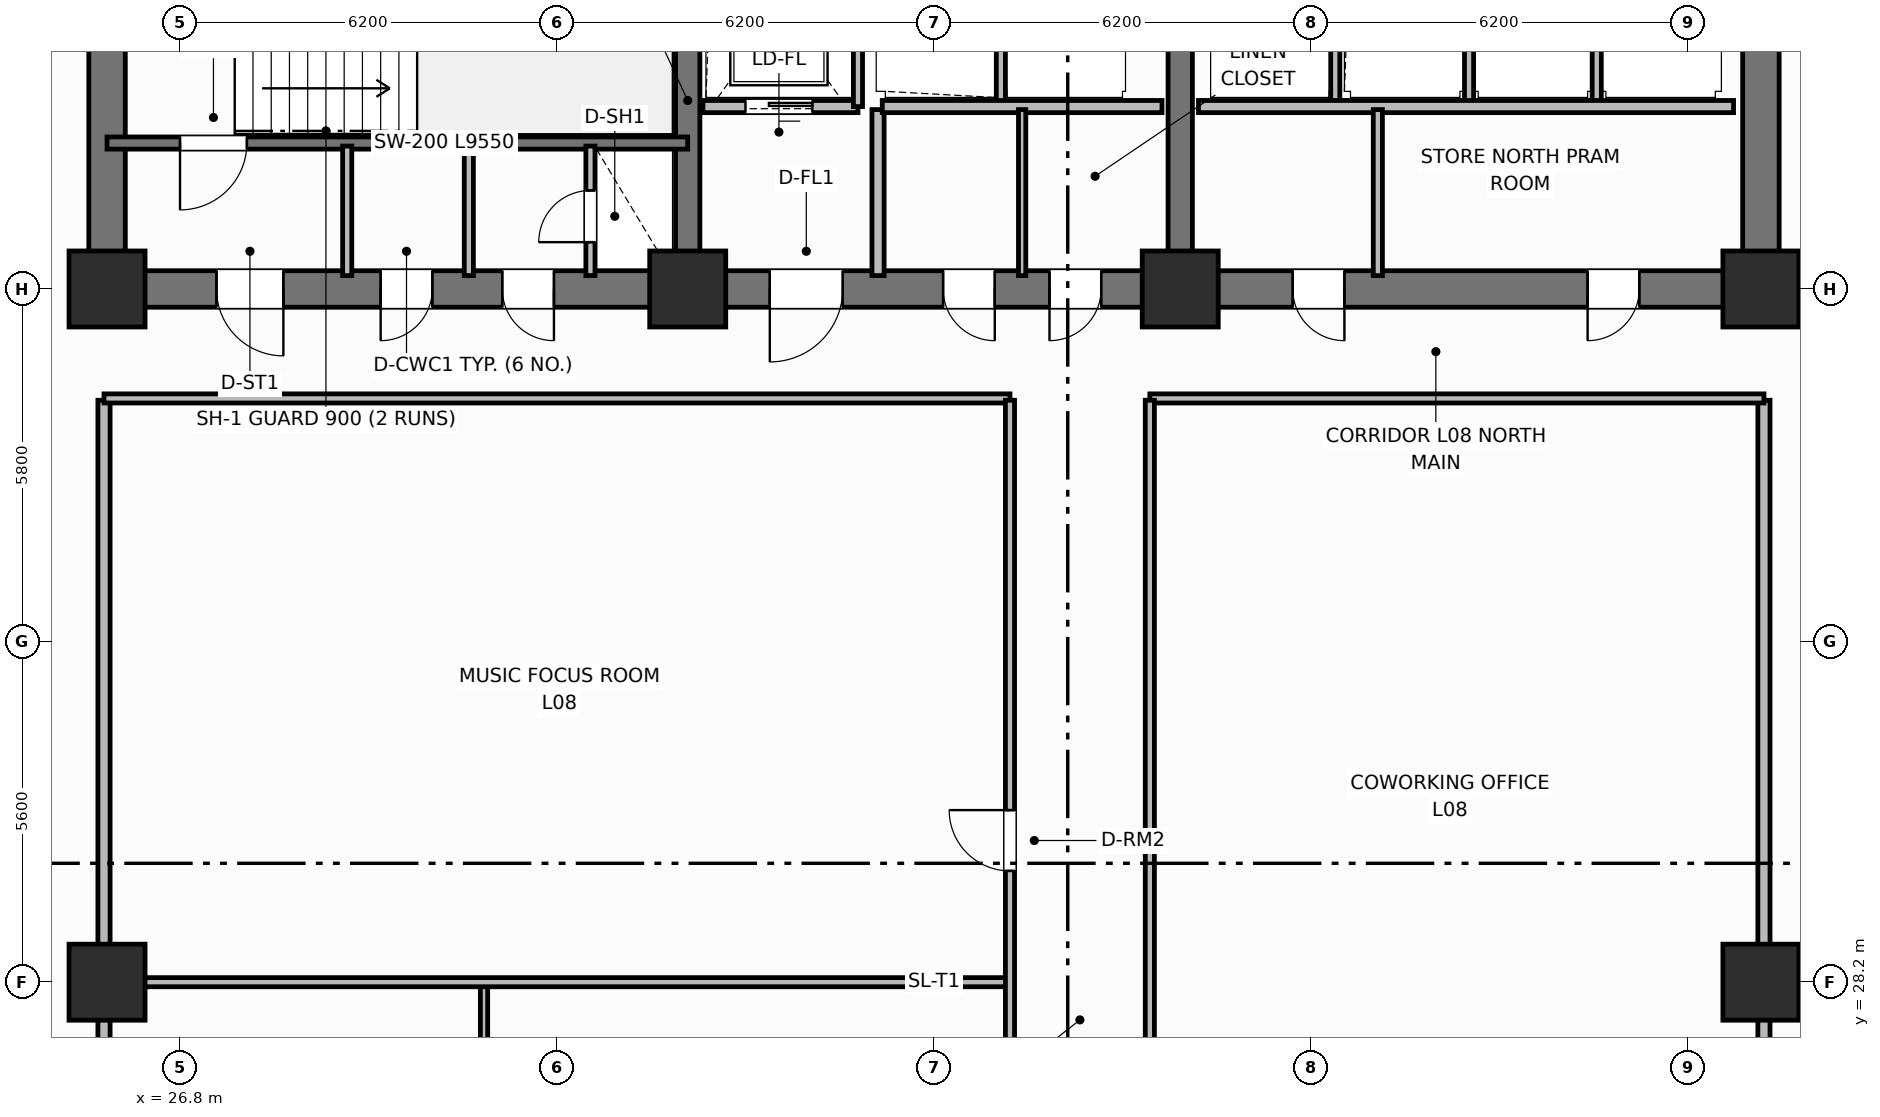
"""IFC4 building model, lengths in metres.
Left out: names, types, materials, properties, quantities, classifications, styles, units other than length and angle.
Written with IfcOpenShell. Run it as: python <this file> out.ifc"""

import sys

from ifc_helpers import new_model, si_unit, direction, frame, frame_2d, origin, origin_2d, place, context, subcontext, project, spatial, rectangle, extrude, element, fill, save


model = new_model("IFC4")
c1 = context("Model", 3, precision=1e-05, world=origin(), true_north=direction((0.0, 1.0)))
c2 = subcontext(c1, "Body", "Model", "MODEL_VIEW")
j1 = project(units=[si_unit("LENGTHUNIT", "METRE"), si_unit("PLANEANGLEUNIT", "RADIAN")], contexts=[c1])
p1 = place(None, origin())
s1 = spatial("IfcSite", under=j1, at=p1, CompositionType="ELEMENT")
p2 = place(p1, origin())
s2 = spatial("IfcBuilding", under=s1, at=p2, CompositionType="ELEMENT")
p3 = place(p2, frame((0.0, 0.0, 36.2)))
s3 = spatial("IfcBuildingStorey", under=s2, at=p3, CompositionType="ELEMENT", Elevation=36.2)
for number, where, z_axis, x_axis in (
    (1, (25.6, 39.9, 0.0), (0.0, 0.0, 1.0), (0.0, 1.0, 0.0)),
    (2, (52.8, 39.9, 0.0), (0.0, 0.0, 1.0), (0.0, 1.0, 0.0)),
):
    element("IfcWall", number, at=place(p3, frame(where, z_axis=z_axis, x_axis=x_axis)), inside=s3, PredefinedType="SHEAR", context=c2, shape_type="SweptSolid", body=[
        extrude(rectangle(XDim=5.6, YDim=0.6, at=frame_2d((2.8, 0.0))), origin(), (0.0, 0.0, 1.0), 3.7),
    ])
p4 = place(p3, frame((52.8, 39.6, 0.0), z_axis=(0.0, 0.0, 1.0), x_axis=(-1.0, 0.0, 0.0)))
e3 = element("IfcWall", 3, at=p4, inside=s3, PredefinedType="SHEAR", context=c2, shape_type="SweptSolid", body=[
    extrude(rectangle(XDim=27.2, YDim=0.6, at=frame_2d((13.6, 0.0))), origin(), (0.0, 0.0, 1.0), 3.7),
])
p5 = place(p4, frame((24.3, 0.0, 0.0)))
e4 = element("IfcOpeningElement", 4, at=p5, cuts=e3, PredefinedType="OPENING", context=c2, shape_type="SweptSolid", body=[
    extrude(rectangle(XDim=1.1, YDim=2.15, at=frame_2d((0.55, 1.075))), frame((0.0, 0.31, 0.0), z_axis=(0.0, -1.0, 0.0), x_axis=(1.0, 0.0, 0.0)), (0.0, 0.0, 1.0), 0.62),
])
p6 = place(p4, frame((21.85, 0.0, 0.0)))
e5 = element("IfcOpeningElement", 5, at=p6, cuts=e3, PredefinedType="OPENING", context=c2, shape_type="SweptSolid", body=[
    extrude(rectangle(XDim=0.85, YDim=2.1, at=frame_2d((0.425, 1.05))), frame((0.0, 0.31, 0.0), z_axis=(0.0, -1.0, 0.0), x_axis=(1.0, 0.0, 0.0)), (0.0, 0.0, 1.0), 0.62),
])
p7 = place(p4, frame((19.85, 0.0, 0.0)))
e6 = element("IfcOpeningElement", 6, at=p7, cuts=e3, PredefinedType="OPENING", context=c2, shape_type="SweptSolid", body=[
    extrude(rectangle(XDim=0.85, YDim=2.1, at=frame_2d((0.425, 1.05))), frame((0.0, 0.31, 0.0), z_axis=(0.0, -1.0, 0.0), x_axis=(1.0, 0.0, 0.0)), (0.0, 0.0, 1.0), 0.62),
])
p8 = place(p4, frame((15.1, 0.0, 0.0)))
e7 = element("IfcOpeningElement", 7, at=p8, cuts=e3, PredefinedType="OPENING", context=c2, shape_type="SweptSolid", body=[
    extrude(rectangle(XDim=1.2, YDim=2.15, at=frame_2d((0.6, 1.075))), frame((0.0, 0.31, 0.0), z_axis=(0.0, -1.0, 0.0), x_axis=(1.0, 0.0, 0.0)), (0.0, 0.0, 1.0), 0.62),
])
p9 = place(p4, frame((12.6, 0.0, 0.0)))
e8 = element("IfcOpeningElement", 8, at=p9, cuts=e3, PredefinedType="OPENING", context=c2, shape_type="SweptSolid", body=[
    extrude(rectangle(XDim=0.85, YDim=2.1, at=frame_2d((0.425, 1.05))), frame((0.0, 0.31, 0.0), z_axis=(0.0, -1.0, 0.0), x_axis=(1.0, 0.0, 0.0)), (0.0, 0.0, 1.0), 0.62),
])
p10 = place(p4, frame((10.85, 0.0, 0.0)))
e9 = element("IfcOpeningElement", 9, at=p10, cuts=e3, PredefinedType="OPENING", context=c2, shape_type="SweptSolid", body=[
    extrude(rectangle(XDim=0.85, YDim=2.1, at=frame_2d((0.425, 1.05))), frame((0.0, 0.31, 0.0), z_axis=(0.0, -1.0, 0.0), x_axis=(1.0, 0.0, 0.0)), (0.0, 0.0, 1.0), 0.62),
])
p11 = place(p4, frame((6.85, 0.0, 0.0)))
e10 = element("IfcOpeningElement", 10, at=p11, cuts=e3, PredefinedType="OPENING", context=c2, shape_type="SweptSolid", body=[
    extrude(rectangle(XDim=0.85, YDim=2.1, at=frame_2d((0.425, 1.05))), frame((0.0, 0.31, 0.0), z_axis=(0.0, -1.0, 0.0), x_axis=(1.0, 0.0, 0.0)), (0.0, 0.0, 1.0), 0.62),
])
p12 = place(p4, frame((2.0, 0.0, 0.0)))
e11 = element("IfcOpeningElement", 11, at=p12, cuts=e3, PredefinedType="OPENING", context=c2, shape_type="SweptSolid", body=[
    extrude(rectangle(XDim=0.85, YDim=2.1, at=frame_2d((0.425, 1.05))), frame((0.0, 0.31, 0.0), z_axis=(0.0, -1.0, 0.0), x_axis=(1.0, 0.0, 0.0)), (0.0, 0.0, 1.0), 0.62),
])
for number, where, z_axis, x_axis in (
    (12, (35.15, 39.9, 0.0), (0.0, 0.0, 1.0), (0.0, 1.0, 0.0)),
    (13, (43.25, 39.9, 0.0), (0.0, 0.0, 1.0), (0.0, 1.0, 0.0)),
):
    element("IfcWall", number, at=place(p3, frame(where, z_axis=z_axis, x_axis=x_axis)), inside=s3, PredefinedType="SHEAR", context=c2, shape_type="SweptSolid", body=[
        extrude(rectangle(XDim=5.6, YDim=0.4, at=frame_2d((2.8, 0.0))), origin(), (0.0, 0.0, 1.0), 3.7),
    ])
for number, where, z_axis, x_axis in (
    (14, (25.6, 39.6, 0.0), (0.0, 0.0, 1.0), (1.0, 0.0, 0.0)),
    (15, (35.15, 39.6, 0.0), (0.0, 0.0, 1.0), (1.0, 0.0, 0.0)),
    (16, (43.25, 39.6, 0.0), (0.0, 0.0, 1.0), (1.0, 0.0, 0.0)),
    (17, (52.8, 39.6, 0.0), (0.0, 0.0, 1.0), (1.0, 0.0, 0.0)),
    (18, (25.6, 28.2, 0.0), (0.0, 0.0, 1.0), (1.0, 0.0, 0.0)),
    (19, (52.8, 28.2, 0.0), (0.0, 0.0, 1.0), (1.0, 0.0, 0.0)),
):
    element("IfcColumn", number, at=place(p3, frame(where, z_axis=z_axis, x_axis=x_axis)), inside=s3, PredefinedType="COLUMN", context=c2, shape_type="SweptSolid", body=[
        extrude(rectangle(XDim=1.25, YDim=1.25, at=origin_2d()), origin(), (0.0, 0.0, 1.0), 3.7),
    ])
p13 = place(p3, frame((35.15, 42.0, 0.0), z_axis=(0.0, 0.0, 1.0), x_axis=(-1.0, 0.0, 0.0)))
e20 = element("IfcWall", 20, at=p13, inside=s3, PredefinedType="SHEAR", context=c2, shape_type="SweptSolid", body=[
    extrude(rectangle(XDim=9.55, YDim=0.2, at=frame_2d((4.775, 0.0))), origin(), (0.0, 0.0, 1.0), 3.7),
])
p14 = place(p13, frame((7.25, 0.0, 0.0)))
e21 = element("IfcOpeningElement", 21, at=p14, cuts=e20, PredefinedType="OPENING", context=c2, shape_type="SweptSolid", body=[
    extrude(rectangle(XDim=1.1, YDim=2.15, at=frame_2d((0.55, 1.075))), frame((0.0, 0.11, 0.0), z_axis=(0.0, -1.0, 0.0), x_axis=(1.0, 0.0, 0.0)), (0.0, 0.0, 1.0), 0.22),
])
p15 = place(p3, frame((33.55, 39.82, 0.0), z_axis=(0.0, 0.0, 1.0), x_axis=(0.0, 1.0, 0.0)))
e22 = element("IfcWall", 22, at=p15, inside=s3, PredefinedType="PARTITIONING", context=c2, shape_type="SweptSolid", body=[
    extrude(rectangle(XDim=2.13, YDim=0.15, at=frame_2d((1.065, 0.0))), origin(), (0.0, 0.0, 1.0), 2.53),
])
p16 = place(p15, frame((0.55, 0.0, 0.0)))
e23 = element("IfcOpeningElement", 23, at=p16, cuts=e22, PredefinedType="OPENING", context=c2, shape_type="SweptSolid", body=[
    extrude(rectangle(XDim=0.85, YDim=2.05, at=frame_2d((0.425, 1.025))), frame((0.0, 0.085, 0.0), z_axis=(0.0, -1.0, 0.0), x_axis=(1.0, 0.0, 0.0)), (0.0, 0.0, 1.0), 0.17),
])
for number, where, z_axis, x_axis in (
    (24, (29.55, 39.82, 0.0), (0.0, 0.0, 1.0), (0.0, 1.0, 0.0)),
    (25, (31.55, 39.82, 0.0), (0.0, 0.0, 1.0), (0.0, 1.0, 0.0)),
):
    element("IfcWall", number, at=place(p3, frame(where, z_axis=z_axis, x_axis=x_axis)), inside=s3, PredefinedType="PARTITIONING", context=c2, shape_type="SweptSolid", body=[
        extrude(rectangle(XDim=2.13, YDim=0.15, at=frame_2d((1.065, 0.0))), origin(), (0.0, 0.0, 1.0), 2.53),
    ])
p17 = place(p3, frame((37.95, 42.6, 0.0), z_axis=(0.0, 0.0, 1.0), x_axis=(-1.0, 0.0, 0.0)))
e26 = element("IfcWall", 26, at=p17, inside=s3, PredefinedType="PARTITIONING", context=c2, shape_type="SweptSolid", body=[
    extrude(rectangle(XDim=2.55, YDim=0.2, at=frame_2d((1.275, 0.0))), origin(), (0.0, 0.0, 1.0), 2.3),
])
p18 = place(p17, frame((0.75, 0.0, 0.0)))
e27 = element("IfcOpeningElement", 27, at=p18, cuts=e26, PredefinedType="OPENING", context=c2, shape_type="SweptSolid", body=[
    extrude(rectangle(XDim=1.1, YDim=2.15, at=frame_2d((0.55, 1.075))), frame((0.0, 0.11, 0.0), z_axis=(0.0, -1.0, 0.0), x_axis=(1.0, 0.0, 0.0)), (0.0, 0.0, 1.0), 0.22),
])
p19 = place(p3, frame((37.95, 42.6, 0.0), z_axis=(0.0, 0.0, 1.0), x_axis=(0.0, 1.0, 0.0)))
e28 = element("IfcWall", 28, at=p19, inside=s3, PredefinedType="PARTITIONING", context=c2, shape_type="SweptSolid", body=[
    extrude(rectangle(XDim=2.85, YDim=0.15, at=frame_2d((1.425, 0.0))), origin(), (0.0, 0.0, 1.0), 2.53),
])
p20 = place(p3, frame((38.28, 39.82, 0.0), z_axis=(0.0, 0.0, 1.0), x_axis=(0.0, 1.0, 0.0)))
e29 = element("IfcWall", 29, at=p20, inside=s3, PredefinedType="PARTITIONING", context=c2, shape_type="SweptSolid", body=[
    extrude(rectangle(XDim=2.73, YDim=0.2, at=frame_2d((1.365, 0.0))), origin(), (0.0, 0.0, 1.0), 2.53),
])
p21 = place(p3, frame((40.3, 42.65, 0.0), z_axis=(0.0, 0.0, 1.0), x_axis=(0.0, 1.0, 0.0)))
e30 = element("IfcWall", 30, at=p21, inside=s3, PredefinedType="PARTITIONING", context=c2, shape_type="SweptSolid", body=[
    extrude(rectangle(XDim=2.8, YDim=0.15, at=frame_2d((1.4, 0.0))), origin(), (0.0, 0.0, 1.0), 2.53),
])
p22 = place(p3, frame((42.95, 42.6, 0.0), z_axis=(0.0, 0.0, 1.0), x_axis=(-1.0, 0.0, 0.0)))
e31 = element("IfcWall", 31, at=p22, inside=s3, PredefinedType="PARTITIONING", context=c2, shape_type="SweptSolid", body=[
    extrude(rectangle(XDim=4.6, YDim=0.2, at=frame_2d((2.3, 0.0))), origin(), (0.0, 0.0, 1.0), 2.3),
])
p23 = place(p3, frame((40.65, 39.82, 0.0), z_axis=(0.0, 0.0, 1.0), x_axis=(0.0, 1.0, 0.0)))
e32 = element("IfcWall", 32, at=p23, inside=s3, PredefinedType="PARTITIONING", context=c2, shape_type="SweptSolid", body=[
    extrude(rectangle(XDim=2.73, YDim=0.12, at=frame_2d((1.365, 0.0))), origin(), (0.0, 0.0, 1.0), 2.53),
])
for number, where, z_axis, x_axis in (
    (33, (45.8, 42.65, 0.0), (0.0, 0.0, 1.0), (0.0, 1.0, 0.0)),
    (34, (48.0, 42.65, 0.0), (0.0, 0.0, 1.0), (0.0, 1.0, 0.0)),
    (35, (50.1, 42.65, 0.0), (0.0, 0.0, 1.0), (0.0, 1.0, 0.0)),
):
    element("IfcWall", number, at=place(p3, frame(where, z_axis=z_axis, x_axis=x_axis)), inside=s3, PredefinedType="PARTITIONING", context=c2, shape_type="SweptSolid", body=[
        extrude(rectangle(XDim=2.8, YDim=0.15, at=frame_2d((1.4, 0.0))), origin(), (0.0, 0.0, 1.0), 2.53),
    ])
p24 = place(p3, frame((52.35, 42.6, 0.0), z_axis=(0.0, 0.0, 1.0), x_axis=(-1.0, 0.0, 0.0)))
e36 = element("IfcWall", 36, at=p24, inside=s3, PredefinedType="PARTITIONING", context=c2, shape_type="SweptSolid", body=[
    extrude(rectangle(XDim=8.8, YDim=0.2, at=frame_2d((4.4, 0.0))), origin(), (0.0, 0.0, 1.0), 2.53),
])
p25 = place(p3, frame((46.5, 39.82, 0.0), z_axis=(0.0, 0.0, 1.0), x_axis=(0.0, 1.0, 0.0)))
e37 = element("IfcWall", 37, at=p25, inside=s3, PredefinedType="PARTITIONING", context=c2, shape_type="SweptSolid", body=[
    extrude(rectangle(XDim=2.73, YDim=0.15, at=frame_2d((1.365, 0.0))), origin(), (0.0, 0.0, 1.0), 2.53),
])
for number, where, z_axis, x_axis in (
    (38, (25.55, 18.63, 0.0), (0.0, 0.0, 1.0), (0.0, 1.0, 0.0)),
    (39, (52.85, 18.63, 0.0), (0.0, 0.0, 1.0), (0.0, 1.0, 0.0)),
):
    element("IfcWall", number, at=place(p3, frame(where, z_axis=z_axis, x_axis=x_axis)), inside=s3, PredefinedType="PARTITIONING", context=c2, shape_type="SweptSolid", body=[
        extrude(rectangle(XDim=19.14, YDim=0.2, at=frame_2d((9.57, 0.0))), origin(), (0.0, 0.0, 1.0), 2.53),
    ])
p26 = place(p3, frame((25.55, 37.8, 0.0), z_axis=(0.0, 0.0, 1.0), x_axis=(1.0, 0.0, 0.0)))
e40 = element("IfcWall", 40, at=p26, inside=s3, PredefinedType="PARTITIONING", context=c2, shape_type="SweptSolid", body=[
    extrude(rectangle(XDim=14.9, YDim=0.15, at=frame_2d((7.45, 0.0))), origin(), (0.0, 0.0, 1.0), 2.53),
])
p27 = place(p3, frame((42.75, 37.8, 0.0), z_axis=(0.0, 0.0, 1.0), x_axis=(1.0, 0.0, 0.0)))
e41 = element("IfcWall", 41, at=p27, inside=s3, PredefinedType="PARTITIONING", context=c2, shape_type="SweptSolid", body=[
    extrude(rectangle(XDim=10.1, YDim=0.15, at=frame_2d((5.05, 0.0))), origin(), (0.0, 0.0, 1.0), 2.53),
])
p28 = place(p3, frame((31.8, 18.66, 0.0), z_axis=(0.0, 0.0, 1.0), x_axis=(0.0, 1.0, 0.0)))
e42 = element("IfcWall", 42, at=p28, inside=s3, PredefinedType="PARTITIONING", context=c2, shape_type="SweptSolid", body=[
    extrude(rectangle(XDim=9.49, YDim=0.12, at=frame_2d((4.745, 0.0))), origin(), (0.0, 0.0, 1.0), 2.53),
])
p29 = place(p28, frame((2.2, 0.0, 0.0)))
e43 = element("IfcOpeningElement", 43, at=p29, cuts=e42, PredefinedType="OPENING", context=c2, shape_type="SweptSolid", body=[
    extrude(rectangle(XDim=0.9, YDim=2.1, at=frame_2d((0.45, 1.05))), frame((0.0, 0.07, 0.0), z_axis=(0.0, -1.0, 0.0), x_axis=(1.0, 0.0, 0.0)), (0.0, 0.0, 1.0), 0.14),
])
p30 = place(p3, frame((25.6, 28.2, 0.0), z_axis=(0.0, 0.0, 1.0), x_axis=(1.0, 0.0, 0.0)))
e44 = element("IfcWall", 44, at=p30, inside=s3, PredefinedType="PARTITIONING", context=c2, shape_type="SweptSolid", body=[
    extrude(rectangle(XDim=14.87, YDim=0.15, at=frame_2d((7.435, 0.0))), origin(), (0.0, 0.0, 1.0), 2.53),
])
p31 = place(p3, frame((40.45, 18.63, 0.0), z_axis=(0.0, 0.0, 1.0), x_axis=(0.0, 1.0, 0.0)))
e45 = element("IfcWall", 45, at=p31, inside=s3, PredefinedType="PARTITIONING", context=c2, shape_type="SweptSolid", body=[
    extrude(rectangle(XDim=19.14, YDim=0.15, at=frame_2d((9.57, 0.0))), origin(), (0.0, 0.0, 1.0), 2.53),
])
p32 = place(p31, frame((2.4, 0.0, 0.0)))
e46 = element("IfcOpeningElement", 46, at=p32, cuts=e45, PredefinedType="OPENING", context=c2, shape_type="SweptSolid", body=[
    extrude(rectangle(XDim=1.0, YDim=2.15, at=frame_2d((0.5, 1.075))), frame((0.0, 0.085, 0.0), z_axis=(0.0, -1.0, 0.0), x_axis=(1.0, 0.0, 0.0)), (0.0, 0.0, 1.0), 0.17),
])
p33 = place(p31, frame((11.4, 0.0, 0.0)))
e47 = element("IfcOpeningElement", 47, at=p33, cuts=e45, PredefinedType="OPENING", context=c2, shape_type="SweptSolid", body=[
    extrude(rectangle(XDim=1.0, YDim=2.15, at=frame_2d((0.5, 1.075))), frame((0.0, 0.085, 0.0), z_axis=(0.0, -1.0, 0.0), x_axis=(1.0, 0.0, 0.0)), (0.0, 0.0, 1.0), 0.17),
])
p34 = place(p3, frame((42.75, 18.63, 0.0), z_axis=(0.0, 0.0, 1.0), x_axis=(0.0, 1.0, 0.0)))
e48 = element("IfcWall", 48, at=p34, inside=s3, PredefinedType="PARTITIONING", context=c2, shape_type="SweptSolid", body=[
    extrude(rectangle(XDim=19.14, YDim=0.15, at=frame_2d((9.57, 0.0))), origin(), (0.0, 0.0, 1.0), 2.53),
])
p35 = place(p34, frame((5.5, 0.0, 0.0)))
e49 = element("IfcOpeningElement", 49, at=p35, cuts=e48, PredefinedType="OPENING", context=c2, shape_type="SweptSolid", body=[
    extrude(rectangle(XDim=1.0, YDim=2.15, at=frame_2d((0.5, 1.075))), frame((0.0, 0.085, 0.0), z_axis=(0.0, -1.0, 0.0), x_axis=(1.0, 0.0, 0.0)), (0.0, 0.0, 1.0), 0.17),
])
p36 = place(p14, origin())
e50 = element("IfcDoor", 50, at=p36, inside=s3, OperationType="SINGLE_SWING_RIGHT", PredefinedType="DOOR", context=c2, shape_type="SweptSolid", body=[
    extrude(rectangle(XDim=1.1, YDim=2.15, at=frame_2d((0.55, 1.075))), frame((0.0, 0.025, 0.0), z_axis=(0.0, -1.0, 0.0), x_axis=(1.0, 0.0, 0.0)), (0.0, 0.0, 1.0), 0.05),
])
fill(e21, e50)
p37 = place(p16, origin())
e51 = element("IfcDoor", 51, at=p37, inside=s3, OperationType="SINGLE_SWING_LEFT", PredefinedType="TRAPDOOR", context=c2, shape_type="SweptSolid", body=[
    extrude(rectangle(XDim=0.85, YDim=2.05, at=frame_2d((0.425, 1.025))), frame((0.0, 0.025, 0.0), z_axis=(0.0, -1.0, 0.0), x_axis=(1.0, 0.0, 0.0)), (0.0, 0.0, 1.0), 0.05),
])
fill(e23, e51)
p38 = place(p18, origin())
e52 = element("IfcDoor", 52, at=p38, inside=s3, OperationType="SLIDING_TO_LEFT", PredefinedType="DOOR", context=c2, shape_type="SweptSolid", body=[
    extrude(rectangle(XDim=1.1, YDim=2.15, at=frame_2d((0.55, 1.075))), frame((0.0, 0.025, 0.0), z_axis=(0.0, -1.0, 0.0), x_axis=(1.0, 0.0, 0.0)), (0.0, 0.0, 1.0), 0.05),
])
fill(e27, e52)
p39 = place(p33, origin())
e53 = element("IfcDoor", 53, at=p39, inside=s3, OperationType="SINGLE_SWING_RIGHT", PredefinedType="DOOR", context=c2, shape_type="SweptSolid", body=[
    extrude(rectangle(XDim=1.0, YDim=2.15, at=frame_2d((0.5, 1.075))), frame((0.0, 0.025, 0.0), z_axis=(0.0, -1.0, 0.0), x_axis=(1.0, 0.0, 0.0)), (0.0, 0.0, 1.0), 0.05),
])
fill(e47, e53)
p40 = place(p5, origin())
e54 = element("IfcDoor", 54, at=p40, inside=s3, OperationType="SINGLE_SWING_LEFT", PredefinedType="DOOR", context=c2, shape_type="SweptSolid", body=[
    extrude(rectangle(XDim=1.1, YDim=2.15, at=frame_2d((0.55, 1.075))), frame((0.0, 0.025, 0.0), z_axis=(0.0, -1.0, 0.0), x_axis=(1.0, 0.0, 0.0)), (0.0, 0.0, 1.0), 0.05),
])
fill(e4, e54)
p41 = place(p6, origin())
e55 = element("IfcDoor", 55, at=p41, inside=s3, OperationType="SINGLE_SWING_RIGHT", PredefinedType="DOOR", context=c2, shape_type="SweptSolid", body=[
    extrude(rectangle(XDim=0.85, YDim=2.1, at=frame_2d((0.425, 1.05))), frame((0.0, 0.025, 0.0), z_axis=(0.0, -1.0, 0.0), x_axis=(1.0, 0.0, 0.0)), (0.0, 0.0, 1.0), 0.05),
])
fill(e5, e55)
p42 = place(p7, origin())
e56 = element("IfcDoor", 56, at=p42, inside=s3, OperationType="SINGLE_SWING_LEFT", PredefinedType="DOOR", context=c2, shape_type="SweptSolid", body=[
    extrude(rectangle(XDim=0.85, YDim=2.1, at=frame_2d((0.425, 1.05))), frame((0.0, 0.025, 0.0), z_axis=(0.0, -1.0, 0.0), x_axis=(1.0, 0.0, 0.0)), (0.0, 0.0, 1.0), 0.05),
])
fill(e6, e56)
p43 = place(p8, origin())
e57 = element("IfcDoor", 57, at=p43, inside=s3, OperationType="SINGLE_SWING_RIGHT", PredefinedType="DOOR", context=c2, shape_type="SweptSolid", body=[
    extrude(rectangle(XDim=1.2, YDim=2.15, at=frame_2d((0.6, 1.075))), frame((0.0, 0.025, 0.0), z_axis=(0.0, -1.0, 0.0), x_axis=(1.0, 0.0, 0.0)), (0.0, 0.0, 1.0), 0.05),
])
fill(e7, e57)
p44 = place(p9, origin())
e58 = element("IfcDoor", 58, at=p44, inside=s3, OperationType="SINGLE_SWING_LEFT", PredefinedType="DOOR", context=c2, shape_type="SweptSolid", body=[
    extrude(rectangle(XDim=0.85, YDim=2.1, at=frame_2d((0.425, 1.05))), frame((0.0, 0.025, 0.0), z_axis=(0.0, -1.0, 0.0), x_axis=(1.0, 0.0, 0.0)), (0.0, 0.0, 1.0), 0.05),
])
fill(e8, e58)
p45 = place(p10, origin())
e59 = element("IfcDoor", 59, at=p45, inside=s3, OperationType="SINGLE_SWING_RIGHT", PredefinedType="DOOR", context=c2, shape_type="SweptSolid", body=[
    extrude(rectangle(XDim=0.85, YDim=2.1, at=frame_2d((0.425, 1.05))), frame((0.0, 0.025, 0.0), z_axis=(0.0, -1.0, 0.0), x_axis=(1.0, 0.0, 0.0)), (0.0, 0.0, 1.0), 0.05),
])
fill(e9, e59)
p46 = place(p11, origin())
e60 = element("IfcDoor", 60, at=p46, inside=s3, OperationType="SINGLE_SWING_LEFT", PredefinedType="DOOR", context=c2, shape_type="SweptSolid", body=[
    extrude(rectangle(XDim=0.85, YDim=2.1, at=frame_2d((0.425, 1.05))), frame((0.0, 0.025, 0.0), z_axis=(0.0, -1.0, 0.0), x_axis=(1.0, 0.0, 0.0)), (0.0, 0.0, 1.0), 0.05),
])
fill(e10, e60)
p47 = place(p12, origin())
e61 = element("IfcDoor", 61, at=p47, inside=s3, OperationType="SINGLE_SWING_RIGHT", PredefinedType="DOOR", context=c2, shape_type="SweptSolid", body=[
    extrude(rectangle(XDim=0.85, YDim=2.1, at=frame_2d((0.425, 1.05))), frame((0.0, 0.025, 0.0), z_axis=(0.0, -1.0, 0.0), x_axis=(1.0, 0.0, 0.0)), (0.0, 0.0, 1.0), 0.05),
])
fill(e11, e61)
save(model, sys.argv[1])
